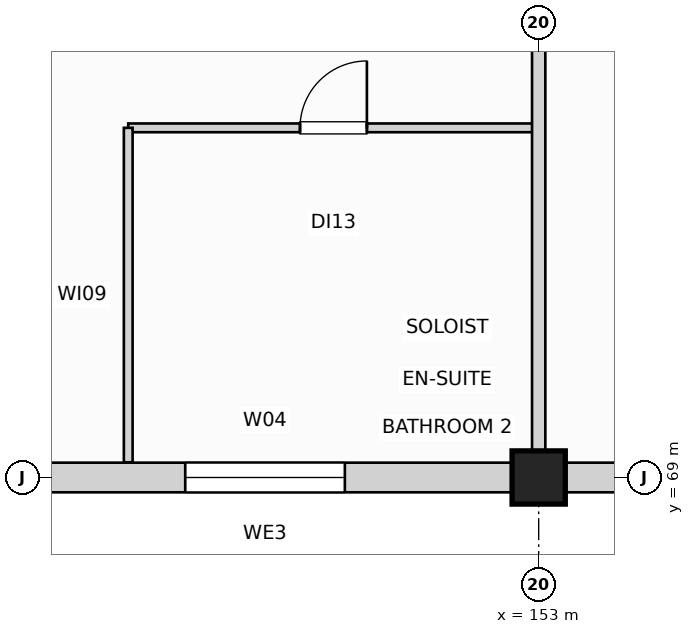
"""IFC4 building model, lengths in metres.
Left out: names, types, materials, properties, quantities, classifications, styles, units other than length and angle.
Written with IfcOpenShell. Run it as: python <this file> out.ifc"""

import sys

from ifc_helpers import new_model, si_unit, direction, frame, frame_2d, origin, origin_2d, place, context, subcontext, project, spatial, rectangle, extrude, element, fill, save


model = new_model("IFC4")
c1 = context("Model", 3, precision=1e-05, world=origin(), true_north=direction((0.0, 1.0)))
c2 = subcontext(c1, "Body", "Model", "MODEL_VIEW")
j1 = project(units=[si_unit("LENGTHUNIT", "METRE"), si_unit("PLANEANGLEUNIT", "RADIAN")], contexts=[c1])
p1 = place(None, origin())
s1 = spatial("IfcSite", under=j1, at=p1, CompositionType="ELEMENT")
p2 = place(p1, origin())
s2 = spatial("IfcBuilding", under=s1, at=p2, CompositionType="ELEMENT")
p3 = place(p2, frame((0.0, 0.0, 6.0)))
s3 = spatial("IfcBuildingStorey", under=s2, at=p3, CompositionType="ELEMENT", Elevation=6.0)
p4 = place(p3, frame((153.0, 69.0, 0.0), z_axis=(0.0, 0.0, 1.0), x_axis=(1.0, 0.0, 0.0)))
e1 = element("IfcColumn", 1, at=p4, inside=s3, PredefinedType="COLUMN", context=c2, shape_type="SweptSolid", body=[
    extrude(rectangle(XDim=0.7, YDim=0.7, at=origin_2d()), origin(), (0.0, 0.0, 1.0), 5.4),
])
p5 = place(p3, frame((152.655, 69.0, 0.0), z_axis=(0.0, 0.0, 1.0), x_axis=(-1.0, 0.0, 0.0)))
e2 = element("IfcWall", 2, at=p5, inside=s3, PredefinedType="SOLIDWALL", context=c2, shape_type="SweptSolid", body=[
    extrude(rectangle(XDim=6.51, YDim=0.39, at=frame_2d((3.255, 0.0))), origin(), (0.0, 0.0, 1.0), 4.465),
])
p6 = place(p5, frame((2.205, 0.0, 0.9)))
e3 = element("IfcOpeningElement", 3, at=p6, cuts=e2, PredefinedType="OPENING", context=c2, shape_type="SweptSolid", body=[
    extrude(rectangle(XDim=2.1, YDim=2.5, at=frame_2d((1.05, 1.25))), frame((0.0, 0.205, 0.0), z_axis=(0.0, -1.0, 0.0), x_axis=(1.0, 0.0, 0.0)), (0.0, 0.0, 1.0), 0.41),
])
p7 = place(p3, frame((159.855, 69.0, 0.0), z_axis=(0.0, 0.0, 1.0), x_axis=(-1.0, 0.0, 0.0)))
e4 = element("IfcWall", 4, at=p7, inside=s3, PredefinedType="SOLIDWALL", context=c2, shape_type="SweptSolid", body=[
    extrude(rectangle(XDim=6.51, YDim=0.39, at=frame_2d((3.255, 0.0))), origin(), (0.0, 0.0, 1.0), 4.425),
])
p8 = place(p7, frame((2.355, 0.0, 0.9)))
e5 = element("IfcOpeningElement", 5, at=p8, cuts=e4, PredefinedType="OPENING", context=c2, shape_type="SweptSolid", body=[
    extrude(rectangle(XDim=1.8, YDim=2.3, at=frame_2d((0.9, 1.15))), frame((0.0, 0.205, 0.0), z_axis=(0.0, -1.0, 0.0), x_axis=(1.0, 0.0, 0.0)), (0.0, 0.0, 1.0), 0.41),
])
p9 = place(p3, frame((147.6, 73.6, 0.0), z_axis=(0.0, 0.0, 1.0), x_axis=(1.0, 0.0, 0.0)))
e6 = element("IfcWall", 6, at=p9, inside=s3, PredefinedType="PARTITIONING", context=c2, shape_type="SweptSolid", body=[
    extrude(rectangle(XDim=5.4, YDim=0.115, at=frame_2d((2.7, 0.0))), origin(), (0.0, 0.0, 1.0), 4.625),
])
p10 = place(p9, frame((2.26, 0.0, 0.0)))
e7 = element("IfcOpeningElement", 7, at=p10, cuts=e6, PredefinedType="OPENING", context=c2, shape_type="SweptSolid", body=[
    extrude(rectangle(XDim=0.88, YDim=2.06, at=frame_2d((0.44, 1.03))), frame((0.0, 0.067, 0.0), z_axis=(0.0, -1.0, 0.0), x_axis=(1.0, 0.0, 0.0)), (0.0, 0.0, 1.0), 0.135),
])
p11 = place(p3, frame((147.6, 69.2, 0.0), z_axis=(0.0, 0.0, 1.0), x_axis=(0.0, 1.0, 0.0)))
e8 = element("IfcWall", 8, at=p11, inside=s3, PredefinedType="PARTITIONING", context=c2, shape_type="SweptSolid", body=[
    extrude(rectangle(XDim=4.4, YDim=0.115, at=frame_2d((2.2, 0.0))), origin(), (0.0, 0.0, 1.0), 4.615),
])
p12 = place(p3, frame((153.0, 69.2, 0.0), z_axis=(0.0, 0.0, 1.0), x_axis=(0.0, 1.0, 0.0)))
e9 = element("IfcWall", 9, at=p12, inside=s3, PredefinedType="PARTITIONING", context=c2, shape_type="SweptSolid", body=[
    extrude(rectangle(XDim=26.05, YDim=0.175, at=frame_2d((13.025, 0.0))), origin(), (0.0, 0.0, 1.0), 4.315),
])
p13 = place(p12, frame((12.5, 0.0, 0.0)))
e10 = element("IfcOpeningElement", 10, at=p13, cuts=e9, PredefinedType="OPENING", context=c2, shape_type="SweptSolid", body=[
    extrude(rectangle(XDim=1.05, YDim=2.12, at=frame_2d((0.525, 1.06))), frame((0.0, 0.097, 0.0), z_axis=(0.0, -1.0, 0.0), x_axis=(1.0, 0.0, 0.0)), (0.0, 0.0, 1.0), 0.195),
])
p14 = place(p6, origin())
e11 = element("IfcWindow", 11, at=p14, inside=s3, PartitioningType="SINGLE_PANEL", PredefinedType="WINDOW", context=c2, shape_type="SweptSolid", body=[
    extrude(rectangle(XDim=2.1, YDim=2.5, at=frame_2d((1.05, 1.25))), frame((0.0, 0.03, 0.0), z_axis=(0.0, -1.0, 0.0), x_axis=(1.0, 0.0, 0.0)), (0.0, 0.0, 1.0), 0.06),
])
fill(e3, e11)
p15 = place(p10, origin())
e12 = element("IfcDoor", 12, at=p15, inside=s3, OperationType="SINGLE_SWING_RIGHT", PredefinedType="DOOR", context=c2, shape_type="SweptSolid", body=[
    extrude(rectangle(XDim=0.88, YDim=2.06, at=frame_2d((0.44, 1.03))), frame((0.0, 0.025, 0.0), z_axis=(0.0, -1.0, 0.0), x_axis=(1.0, 0.0, 0.0)), (0.0, 0.0, 1.0), 0.05),
])
fill(e7, e12)
save(model, sys.argv[1])
